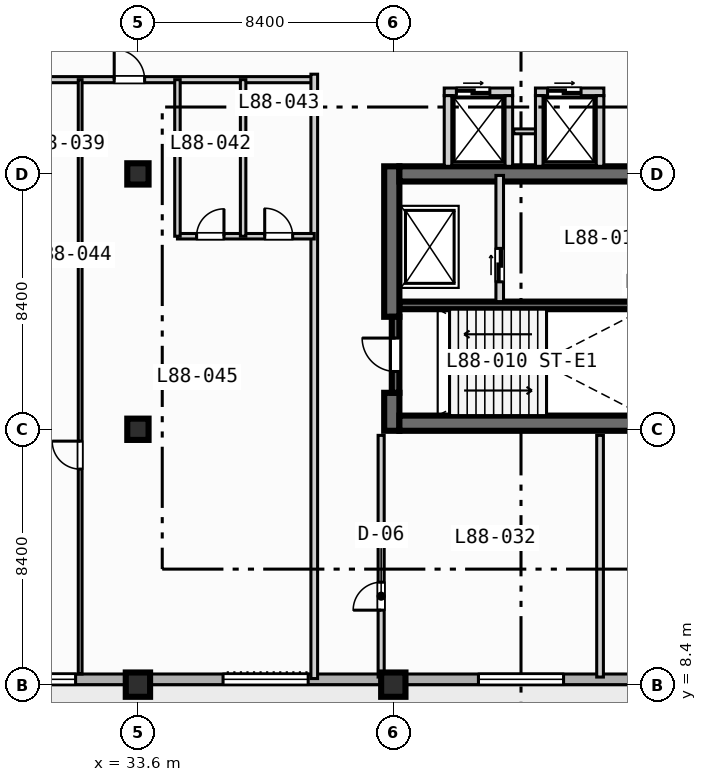
"""IFC4 building model, lengths in metres.
Left out: names, types, materials, properties, quantities, classifications, styles, units other than length and angle.
Written with IfcOpenShell. Run it as: python <this file> out.ifc"""

import sys

from ifc_helpers import new_model, si_unit, direction, frame, frame_2d, origin, origin_2d, place, context, subcontext, project, spatial, rectangle, extrude, element, fill, save


model = new_model("IFC4")
c1 = context("Model", 3, precision=1e-05, world=origin(), true_north=direction((0.0, 1.0)))
c2 = subcontext(c1, "Body", "Model", "MODEL_VIEW")
j1 = project(units=[si_unit("LENGTHUNIT", "METRE"), si_unit("PLANEANGLEUNIT", "RADIAN")], contexts=[c1])
p1 = place(None, origin())
s1 = spatial("IfcSite", under=j1, at=p1, CompositionType="ELEMENT")
p2 = place(p1, origin())
s2 = spatial("IfcBuilding", under=s1, at=p2, CompositionType="ELEMENT")
p3 = place(p2, frame((0.0, 0.0, 355.4)))
s3 = spatial("IfcBuildingStorey", under=s2, at=p3, CompositionType="ELEMENT", Elevation=355.4)
p4 = place(p3, frame((42.2, 20.875, 0.0), z_axis=(0.0, 0.0, 1.0), x_axis=(1.0, 0.0, 0.0)))
e1 = element("IfcWall", 1, at=p4, inside=s3, PredefinedType="SOLIDWALL", context=c2, shape_type="SweptSolid", body=[
    extrude(rectangle(XDim=8.05, YDim=0.25, at=frame_2d((4.025, 0.0))), origin(), (0.0, 0.0, 1.0), 3.97),
])
p5 = place(p3, frame((41.95, 16.75, 0.0), z_axis=(0.0, 0.0, 1.0), x_axis=(0.0, 1.0, 0.0)))
e2 = element("IfcWall", 2, at=p5, inside=s3, PredefinedType="SHEAR", context=c2, shape_type="SweptSolid", body=[
    extrude(rectangle(XDim=1.25, YDim=0.5, at=frame_2d((0.625, 0.0))), origin(), (0.0, 0.0, 1.0), 3.97),
])
p6 = place(p3, frame((41.95, 20.5, 0.0), z_axis=(0.0, 0.0, 1.0), x_axis=(0.0, 1.0, 0.0)))
e3 = element("IfcWall", 3, at=p6, inside=s3, PredefinedType="SHEAR", context=c2, shape_type="SweptSolid", body=[
    extrude(rectangle(XDim=4.95, YDim=0.5, at=frame_2d((2.475, 0.0))), origin(), (0.0, 0.0, 1.0), 3.97),
])
p7 = place(p3, frame((42.2, 17.0, 0.0), z_axis=(0.0, 0.0, 1.0), x_axis=(1.0, 0.0, 0.0)))
e4 = element("IfcWall", 4, at=p7, inside=s3, PredefinedType="SHEAR", context=c2, shape_type="SweptSolid", body=[
    extrude(rectangle(XDim=16.35, YDim=0.5, at=frame_2d((8.175, 0.0))), origin(), (0.0, 0.0, 1.0), 3.97),
])
p8 = place(p3, frame((42.2, 25.2, 0.0), z_axis=(0.0, 0.0, 1.0), x_axis=(1.0, 0.0, 0.0)))
e5 = element("IfcWall", 5, at=p8, inside=s3, PredefinedType="SHEAR", context=c2, shape_type="SweptSolid", body=[
    extrude(rectangle(XDim=8.6, YDim=0.5, at=frame_2d((4.3, 0.0))), origin(), (0.0, 0.0, 1.0), 3.97),
])
p9 = place(p3, frame((33.6, 8.4, 0.0), z_axis=(0.0, 0.0, 1.0), x_axis=(1.0, 0.0, 0.0)))
e6 = element("IfcColumn", 6, at=p9, inside=s3, PredefinedType="COLUMN", context=c2, shape_type="SweptSolid", body=[
    extrude(rectangle(XDim=0.8, YDim=0.8, at=origin_2d()), origin(), (0.0, 0.0, 1.0), 4.2),
])
for number, where, z_axis, x_axis in (
    (7, (33.6, 16.8, 0.0), (0.0, 0.0, 1.0), (1.0, 0.0, 0.0)),
    (8, (33.6, 25.2, 0.0), (0.0, 0.0, 1.0), (1.0, 0.0, 0.0)),
):
    element("IfcColumn", number, at=place(p3, frame(where, z_axis=z_axis, x_axis=x_axis)), inside=s3, PredefinedType="COLUMN", context=c2, shape_type="SweptSolid", body=[
        extrude(rectangle(XDim=0.7, YDim=0.7, at=origin_2d()), origin(), (0.0, 0.0, 1.0), 4.2),
    ])
p10 = place(p3, frame((42.0, 8.4, 0.0), z_axis=(0.0, 0.0, 1.0), x_axis=(1.0, 0.0, 0.0)))
e9 = element("IfcColumn", 9, at=p10, inside=s3, PredefinedType="COLUMN", context=c2, shape_type="SweptSolid", body=[
    extrude(rectangle(XDim=0.8, YDim=0.8, at=origin_2d()), origin(), (0.0, 0.0, 1.0), 4.2),
])
p11 = place(p3, frame((64.025, 8.575, 0.0), z_axis=(0.0, 0.0, 1.0), x_axis=(-1.0, 0.0, 0.0)))
e10 = element("IfcWall", 10, at=p11, inside=s3, PredefinedType="STANDARD", context=c2, shape_type="SweptSolid", body=[
    extrude(rectangle(XDim=52.45, YDim=0.35, at=frame_2d((26.225, 0.0))), origin(), (0.0, 0.0, 1.0), 3.97),
])
p12 = place(p11, frame((34.925, 0.0, 0.0)))
e11 = element("IfcOpeningElement", 11, at=p12, cuts=e10, PredefinedType="OPENING", context=c2, shape_type="SweptSolid", body=[
    extrude(rectangle(XDim=1.4, YDim=2.2, at=frame_2d((0.7, 1.1))), frame((0.0, 0.185, 0.0), z_axis=(0.0, -1.0, 0.0), x_axis=(1.0, 0.0, 0.0)), (0.0, 0.0, 1.0), 0.37),
])
p13 = place(p11, frame((24.825, 0.0, 0.85)))
e12 = element("IfcOpeningElement", 12, at=p13, cuts=e10, PredefinedType="OPENING", context=c2, shape_type="SweptSolid", body=[
    extrude(rectangle(XDim=2.8, YDim=2.1, at=frame_2d((1.4, 1.05))), frame((0.0, 0.185, 0.0), z_axis=(0.0, -1.0, 0.0), x_axis=(1.0, 0.0, 0.0)), (0.0, 0.0, 1.0), 0.37),
])
p14 = place(p11, frame((16.425, 0.0, 0.85)))
e13 = element("IfcOpeningElement", 13, at=p14, cuts=e10, PredefinedType="OPENING", context=c2, shape_type="SweptSolid", body=[
    extrude(rectangle(XDim=2.8, YDim=2.1, at=frame_2d((1.4, 1.05))), frame((0.0, 0.185, 0.0), z_axis=(0.0, -1.0, 0.0), x_axis=(1.0, 0.0, 0.0)), (0.0, 0.0, 1.0), 0.37),
])
p15 = place(p11, frame((50.275, 0.0, 0.85)))
e14 = element("IfcOpeningElement", 14, at=p15, cuts=e10, PredefinedType="OPENING", context=c2, shape_type="SweptSolid", body=[
    extrude(rectangle(XDim=1.8, YDim=1.8, at=frame_2d((0.9, 0.9))), frame((0.0, 0.185, 0.0), z_axis=(0.0, -1.0, 0.0), x_axis=(1.0, 0.0, 0.0)), (0.0, 0.0, 1.0), 0.37),
])
p16 = place(p11, frame((44.875, 0.0, 0.85)))
e15 = element("IfcOpeningElement", 15, at=p16, cuts=e10, PredefinedType="OPENING", context=c2, shape_type="SweptSolid", body=[
    extrude(rectangle(XDim=1.8, YDim=1.8, at=frame_2d((0.9, 0.9))), frame((0.0, 0.185, 0.0), z_axis=(0.0, -1.0, 0.0), x_axis=(1.0, 0.0, 0.0)), (0.0, 0.0, 1.0), 0.37),
])
p17 = place(p11, frame((41.475, 0.0, 0.85)))
e16 = element("IfcOpeningElement", 16, at=p17, cuts=e10, PredefinedType="OPENING", context=c2, shape_type="SweptSolid", body=[
    extrude(rectangle(XDim=1.8, YDim=1.8, at=frame_2d((0.9, 0.9))), frame((0.0, 0.185, 0.0), z_axis=(0.0, -1.0, 0.0), x_axis=(1.0, 0.0, 0.0)), (0.0, 0.0, 1.0), 0.37),
])
p18 = place(p11, frame((32.475, 0.0, 0.85)))
e17 = element("IfcOpeningElement", 17, at=p18, cuts=e10, PredefinedType="OPENING", context=c2, shape_type="SweptSolid", body=[
    extrude(rectangle(XDim=1.8, YDim=1.8, at=frame_2d((0.9, 0.9))), frame((0.0, 0.185, 0.0), z_axis=(0.0, -1.0, 0.0), x_axis=(1.0, 0.0, 0.0)), (0.0, 0.0, 1.0), 0.37),
])
p19 = place(p3, frame((42.075, 18.0, 0.0), z_axis=(0.0, 0.0, 1.0), x_axis=(0.0, 1.0, 0.0)))
e18 = element("IfcWall", 18, at=p19, inside=s3, PredefinedType="SOLIDWALL", context=c2, shape_type="SweptSolid", body=[
    extrude(rectangle(XDim=2.5, YDim=0.25, at=frame_2d((1.25, 0.0))), origin(), (0.0, 0.0, 1.0), 3.97),
])
p20 = place(p19, frame((0.7, 0.0, 0.0)))
e19 = element("IfcOpeningElement", 19, at=p20, cuts=e18, PredefinedType="OPENING", context=c2, shape_type="SweptSolid", body=[
    extrude(rectangle(XDim=1.1, YDim=2.15, at=frame_2d((0.55, 1.075))), frame((0.0, 0.135, 0.0), z_axis=(0.0, -1.0, 0.0), x_axis=(1.0, 0.0, 0.0)), (0.0, 0.0, 1.0), 0.27),
])
p21 = place(p3, frame((45.5, 21.0, 0.0), z_axis=(0.0, 0.0, 1.0), x_axis=(0.0, 1.0, 0.0)))
e20 = element("IfcWall", 20, at=p21, inside=s3, PredefinedType="SOLIDWALL", context=c2, shape_type="SweptSolid", body=[
    extrude(rectangle(XDim=4.15, YDim=0.25, at=frame_2d((2.075, 0.0))), origin(), (0.0, 0.0, 1.0), 3.97),
])
p22 = place(p21, frame((0.65, 0.0, 0.0)))
e21 = element("IfcOpeningElement", 21, at=p22, cuts=e20, PredefinedType="OPENING", context=c2, shape_type="SweptSolid", body=[
    extrude(rectangle(XDim=1.1, YDim=2.15, at=frame_2d((0.55, 1.075))), frame((0.0, 0.135, 0.0), z_axis=(0.0, -1.0, 0.0), x_axis=(1.0, 0.0, 0.0)), (0.0, 0.0, 1.0), 0.27),
])
p23 = place(p3, frame((43.675, 27.9, 0.0), z_axis=(0.0, 0.0, 1.0), x_axis=(1.0, 0.0, 0.0)))
e22 = element("IfcWall", 22, at=p23, inside=s3, PredefinedType="SOLIDWALL", context=c2, shape_type="SweptSolid", body=[
    extrude(rectangle(XDim=2.25, YDim=0.25, at=frame_2d((1.125, 0.0))), origin(), (0.0, 0.0, 1.0), 3.97),
])
p24 = place(p23, frame((0.4, 0.0, 0.0)))
e23 = element("IfcOpeningElement", 23, at=p24, cuts=e22, PredefinedType="OPENING", context=c2, shape_type="SweptSolid", body=[
    extrude(rectangle(XDim=1.1, YDim=2.15, at=frame_2d((0.55, 1.075))), frame((0.0, 0.135, 0.0), z_axis=(0.0, -1.0, 0.0), x_axis=(1.0, 0.0, 0.0)), (0.0, 0.0, 1.0), 0.27),
])
for number, where, z_axis, x_axis in (
    (24, (43.8, 25.45, 0.0), (0.0, 0.0, 1.0), (0.0, 1.0, 0.0)),
    (25, (45.8, 25.45, 0.0), (0.0, 0.0, 1.0), (0.0, 1.0, 0.0)),
):
    element("IfcWall", number, at=place(p3, frame(where, z_axis=z_axis, x_axis=x_axis)), inside=s3, PredefinedType="SOLIDWALL", context=c2, shape_type="SweptSolid", body=[
        extrude(rectangle(XDim=2.325, YDim=0.25, at=frame_2d((1.163, 0.0))), origin(), (0.0, 0.0, 1.0), 3.97),
    ])
p25 = place(p3, frame((45.96, 26.6, 0.0), z_axis=(0.0, 0.0, 1.0), x_axis=(1.0, 0.0, 0.0)))
e26 = element("IfcWall", 26, at=p25, inside=s3, PredefinedType="PARTITIONING", context=c2, shape_type="SweptSolid", body=[
    extrude(rectangle(XDim=0.88, YDim=0.16, at=frame_2d((0.44, 0.0))), origin(), (0.0, 0.0, 1.0), 3.97),
])
p26 = place(p3, frame((46.675, 27.9, 0.0), z_axis=(0.0, 0.0, 1.0), x_axis=(1.0, 0.0, 0.0)))
e27 = element("IfcWall", 27, at=p26, inside=s3, PredefinedType="SOLIDWALL", context=c2, shape_type="SweptSolid", body=[
    extrude(rectangle(XDim=2.25, YDim=0.25, at=frame_2d((1.125, 0.0))), origin(), (0.0, 0.0, 1.0), 3.97),
])
p27 = place(p26, frame((0.4, 0.0, 0.0)))
e28 = element("IfcOpeningElement", 28, at=p27, cuts=e27, PredefinedType="OPENING", context=c2, shape_type="SweptSolid", body=[
    extrude(rectangle(XDim=1.1, YDim=2.15, at=frame_2d((0.55, 1.075))), frame((0.0, 0.135, 0.0), z_axis=(0.0, -1.0, 0.0), x_axis=(1.0, 0.0, 0.0)), (0.0, 0.0, 1.0), 0.27),
])
for number, where, z_axis, x_axis in (
    (29, (46.8, 25.45, 0.0), (0.0, 0.0, 1.0), (0.0, 1.0, 0.0)),
    (30, (48.8, 25.45, 0.0), (0.0, 0.0, 1.0), (0.0, 1.0, 0.0)),
):
    element("IfcWall", number, at=place(p3, frame(where, z_axis=z_axis, x_axis=x_axis)), inside=s3, PredefinedType="SOLIDWALL", context=c2, shape_type="SweptSolid", body=[
        extrude(rectangle(XDim=2.325, YDim=0.25, at=frame_2d((1.163, 0.0))), origin(), (0.0, 0.0, 1.0), 3.97),
    ])
p28 = place(p3, frame((41.6, 8.65, 0.0), z_axis=(0.0, 0.0, 1.0), x_axis=(0.0, 1.0, 0.0)))
e31 = element("IfcWall", 31, at=p28, inside=s3, PredefinedType="PARTITIONING", context=c2, shape_type="SweptSolid", body=[
    extrude(rectangle(XDim=7.95, YDim=0.2, at=frame_2d((3.975, 0.0))), origin(), (0.0, 0.0, 1.0), 3.97),
])
p29 = place(p28, frame((2.2, 0.0, 0.0)))
e32 = element("IfcOpeningElement", 32, at=p29, cuts=e31, PredefinedType="OPENING", context=c2, shape_type="SweptSolid", body=[
    extrude(rectangle(XDim=0.92, YDim=2.1, at=frame_2d((0.46, 1.05))), frame((0.0, 0.11, 0.0), z_axis=(0.0, -1.0, 0.0), x_axis=(1.0, 0.0, 0.0)), (0.0, 0.0, 1.0), 0.22),
])
p30 = place(p3, frame((48.8, 8.65, 0.0), z_axis=(0.0, 0.0, 1.0), x_axis=(0.0, 1.0, 0.0)))
e33 = element("IfcWall", 33, at=p30, inside=s3, PredefinedType="PARTITIONING", context=c2, shape_type="SweptSolid", body=[
    extrude(rectangle(XDim=7.95, YDim=0.22, at=frame_2d((3.975, 0.0))), origin(), (0.0, 0.0, 1.0), 3.97),
])
p31 = place(p3, frame((11.8, 28.3, 0.0), z_axis=(0.0, 0.0, 1.0), x_axis=(1.0, 0.0, 0.0)))
e34 = element("IfcWall", 34, at=p31, inside=s3, PredefinedType="PARTITIONING", context=c2, shape_type="SweptSolid", body=[
    extrude(rectangle(XDim=27.6, YDim=0.2, at=frame_2d((13.8, 0.0))), origin(), (0.0, 0.0, 1.0), 3.97),
])
p32 = place(p31, frame((2.72, 0.0, 0.0)))
e35 = element("IfcOpeningElement", 35, at=p32, cuts=e34, PredefinedType="OPENING", context=c2, shape_type="SweptSolid", body=[
    extrude(rectangle(XDim=1.0, YDim=2.15, at=frame_2d((0.5, 1.075))), frame((0.0, 0.11, 0.0), z_axis=(0.0, -1.0, 0.0), x_axis=(1.0, 0.0, 0.0)), (0.0, 0.0, 1.0), 0.22),
])
p33 = place(p31, frame((11.62, 0.0, 0.0)))
e36 = element("IfcOpeningElement", 36, at=p33, cuts=e34, PredefinedType="OPENING", context=c2, shape_type="SweptSolid", body=[
    extrude(rectangle(XDim=1.0, YDim=2.15, at=frame_2d((0.5, 1.075))), frame((0.0, 0.11, 0.0), z_axis=(0.0, -1.0, 0.0), x_axis=(1.0, 0.0, 0.0)), (0.0, 0.0, 1.0), 0.22),
])
p34 = place(p31, frame((21.02, 0.0, 0.0)))
e37 = element("IfcOpeningElement", 37, at=p34, cuts=e34, PredefinedType="OPENING", context=c2, shape_type="SweptSolid", body=[
    extrude(rectangle(XDim=1.0, YDim=2.15, at=frame_2d((0.5, 1.075))), frame((0.0, 0.11, 0.0), z_axis=(0.0, -1.0, 0.0), x_axis=(1.0, 0.0, 0.0)), (0.0, 0.0, 1.0), 0.22),
])
p35 = place(p3, frame((39.4, 8.6, 0.0), z_axis=(0.0, 0.0, 1.0), x_axis=(0.0, 1.0, 0.0)))
e38 = element("IfcWall", 38, at=p35, inside=s3, PredefinedType="PARTITIONING", context=c2, shape_type="SweptSolid", body=[
    extrude(rectangle(XDim=19.88, YDim=0.22, at=frame_2d((9.94, 0.0))), origin(), (0.0, 0.0, 1.0), 3.97),
])
p36 = place(p3, frame((34.9, 23.15, 0.0), z_axis=(0.0, 0.0, 1.0), x_axis=(1.0, 0.0, 0.0)))
e39 = element("IfcWall", 39, at=p36, inside=s3, PredefinedType="PLUMBINGWALL", context=c2, shape_type="SweptSolid", body=[
    extrude(rectangle(XDim=4.5, YDim=0.18, at=frame_2d((2.25, 0.0))), origin(), (0.0, 0.0, 1.0), 3.97),
])
p37 = place(p36, frame((0.63, 0.0, 0.0)))
e40 = element("IfcOpeningElement", 40, at=p37, cuts=e39, PredefinedType="OPENING", context=c2, shape_type="SweptSolid", body=[
    extrude(rectangle(XDim=0.9, YDim=2.1, at=frame_2d((0.45, 1.05))), frame((0.0, 0.1, 0.0), z_axis=(0.0, -1.0, 0.0), x_axis=(1.0, 0.0, 0.0)), (0.0, 0.0, 1.0), 0.2),
])
p38 = place(p36, frame((2.87, 0.0, 0.0)))
e41 = element("IfcOpeningElement", 41, at=p38, cuts=e39, PredefinedType="OPENING", context=c2, shape_type="SweptSolid", body=[
    extrude(rectangle(XDim=0.92, YDim=2.1, at=frame_2d((0.46, 1.05))), frame((0.0, 0.1, 0.0), z_axis=(0.0, -1.0, 0.0), x_axis=(1.0, 0.0, 0.0)), (0.0, 0.0, 1.0), 0.2),
])
for number, where, z_axis, x_axis in (
    (42, (34.9, 23.15, 0.0), (0.0, 0.0, 1.0), (0.0, 1.0, 0.0)),
    (43, (37.06, 23.15, 0.0), (0.0, 0.0, 1.0), (0.0, 1.0, 0.0)),
):
    element("IfcWall", number, at=place(p3, frame(where, z_axis=z_axis, x_axis=x_axis)), inside=s3, PredefinedType="PLUMBINGWALL", context=c2, shape_type="SweptSolid", body=[
        extrude(rectangle(XDim=5.15, YDim=0.18, at=frame_2d((2.575, 0.0))), origin(), (0.0, 0.0, 1.0), 3.97),
    ])
p39 = place(p3, frame((31.7, 8.75, 0.0), z_axis=(0.0, 0.0, 1.0), x_axis=(0.0, 1.0, 0.0)))
e44 = element("IfcWall", 44, at=p39, inside=s3, PredefinedType="PARTITIONING", context=c2, shape_type="SweptSolid", body=[
    extrude(rectangle(XDim=19.55, YDim=0.125, at=frame_2d((9.775, 0.0))), origin(), (0.0, 0.0, 1.0), 3.97),
])
p40 = place(p39, frame((6.74, 0.0, 0.0)))
e45 = element("IfcOpeningElement", 45, at=p40, cuts=e44, PredefinedType="OPENING", context=c2, shape_type="SweptSolid", body=[
    extrude(rectangle(XDim=0.92, YDim=2.1, at=frame_2d((0.46, 1.05))), frame((0.0, 0.073, 0.0), z_axis=(0.0, -1.0, 0.0), x_axis=(1.0, 0.0, 0.0)), (0.0, 0.0, 1.0), 0.145),
])
p41 = place(p13, origin())
e46 = element("IfcWindow", 46, at=p41, inside=s3, PartitioningType="SINGLE_PANEL", PredefinedType="WINDOW", context=c2, shape_type="SweptSolid", body=[
    extrude(rectangle(XDim=2.8, YDim=2.1, at=frame_2d((1.4, 1.05))), frame((0.0, 0.03, 0.0), z_axis=(0.0, -1.0, 0.0), x_axis=(1.0, 0.0, 0.0)), (0.0, 0.0, 1.0), 0.06),
])
fill(e12, e46)
p42 = place(p14, origin())
e47 = element("IfcWindow", 47, at=p42, inside=s3, PartitioningType="SINGLE_PANEL", PredefinedType="WINDOW", context=c2, shape_type="SweptSolid", body=[
    extrude(rectangle(XDim=2.8, YDim=2.1, at=frame_2d((1.4, 1.05))), frame((0.0, 0.03, 0.0), z_axis=(0.0, -1.0, 0.0), x_axis=(1.0, 0.0, 0.0)), (0.0, 0.0, 1.0), 0.06),
])
fill(e13, e47)
p43 = place(p18, origin())
e48 = element("IfcWindow", 48, at=p43, inside=s3, PartitioningType="SINGLE_PANEL", PredefinedType="WINDOW", context=c2, shape_type="SweptSolid", body=[
    extrude(rectangle(XDim=1.8, YDim=1.8, at=frame_2d((0.9, 0.9))), frame((0.0, 0.03, 0.0), z_axis=(0.0, -1.0, 0.0), x_axis=(1.0, 0.0, 0.0)), (0.0, 0.0, 1.0), 0.06),
])
fill(e17, e48)
p44 = place(p20, origin())
e49 = element("IfcDoor", 49, at=p44, inside=s3, OperationType="SINGLE_SWING_RIGHT", PredefinedType="DOOR", context=c2, shape_type="SweptSolid", body=[
    extrude(rectangle(XDim=1.1, YDim=2.15, at=frame_2d((0.55, 1.075))), frame((0.0, 0.025, 0.0), z_axis=(0.0, -1.0, 0.0), x_axis=(1.0, 0.0, 0.0)), (0.0, 0.0, 1.0), 0.05),
])
fill(e19, e49)
p45 = place(p22, origin())
e50 = element("IfcDoor", 50, at=p45, inside=s3, OperationType="SLIDING_TO_LEFT", PredefinedType="DOOR", context=c2, shape_type="SweptSolid", body=[
    extrude(rectangle(XDim=1.1, YDim=2.15, at=frame_2d((0.55, 1.075))), frame((0.0, 0.025, 0.0), z_axis=(0.0, -1.0, 0.0), x_axis=(1.0, 0.0, 0.0)), (0.0, 0.0, 1.0), 0.05),
])
fill(e21, e50)
p46 = place(p24, origin())
e51 = element("IfcDoor", 51, at=p46, inside=s3, OperationType="SLIDING_TO_LEFT", PredefinedType="DOOR", context=c2, shape_type="SweptSolid", body=[
    extrude(rectangle(XDim=1.1, YDim=2.15, at=frame_2d((0.55, 1.075))), frame((0.0, 0.025, 0.0), z_axis=(0.0, -1.0, 0.0), x_axis=(1.0, 0.0, 0.0)), (0.0, 0.0, 1.0), 0.05),
])
fill(e23, e51)
p47 = place(p27, origin())
e52 = element("IfcDoor", 52, at=p47, inside=s3, OperationType="SLIDING_TO_LEFT", PredefinedType="DOOR", context=c2, shape_type="SweptSolid", body=[
    extrude(rectangle(XDim=1.1, YDim=2.15, at=frame_2d((0.55, 1.075))), frame((0.0, 0.025, 0.0), z_axis=(0.0, -1.0, 0.0), x_axis=(1.0, 0.0, 0.0)), (0.0, 0.0, 1.0), 0.05),
])
fill(e28, e52)
p48 = place(p29, origin())
e53 = element("IfcDoor", 53, at=p48, inside=s3, OperationType="SINGLE_SWING_LEFT", PredefinedType="DOOR", context=c2, shape_type="SweptSolid", body=[
    extrude(rectangle(XDim=0.92, YDim=2.1, at=frame_2d((0.46, 1.05))), frame((0.0, 0.025, 0.0), z_axis=(0.0, -1.0, 0.0), x_axis=(1.0, 0.0, 0.0)), (0.0, 0.0, 1.0), 0.05),
])
fill(e32, e53)
p49 = place(p34, origin())
e54 = element("IfcDoor", 54, at=p49, inside=s3, OperationType="SINGLE_SWING_LEFT", PredefinedType="DOOR", context=c2, shape_type="SweptSolid", body=[
    extrude(rectangle(XDim=1.0, YDim=2.15, at=frame_2d((0.5, 1.075))), frame((0.0, 0.025, 0.0), z_axis=(0.0, -1.0, 0.0), x_axis=(1.0, 0.0, 0.0)), (0.0, 0.0, 1.0), 0.05),
])
fill(e37, e54)
p50 = place(p37, origin())
e55 = element("IfcDoor", 55, at=p50, inside=s3, OperationType="SINGLE_SWING_RIGHT", PredefinedType="DOOR", context=c2, shape_type="SweptSolid", body=[
    extrude(rectangle(XDim=0.9, YDim=2.1, at=frame_2d((0.45, 1.05))), frame((0.0, 0.025, 0.0), z_axis=(0.0, -1.0, 0.0), x_axis=(1.0, 0.0, 0.0)), (0.0, 0.0, 1.0), 0.05),
])
fill(e40, e55)
p51 = place(p38, origin())
e56 = element("IfcDoor", 56, at=p51, inside=s3, OperationType="SINGLE_SWING_LEFT", PredefinedType="DOOR", context=c2, shape_type="SweptSolid", body=[
    extrude(rectangle(XDim=0.92, YDim=2.1, at=frame_2d((0.46, 1.05))), frame((0.0, 0.025, 0.0), z_axis=(0.0, -1.0, 0.0), x_axis=(1.0, 0.0, 0.0)), (0.0, 0.0, 1.0), 0.05),
])
fill(e41, e56)
p52 = place(p40, origin())
e57 = element("IfcDoor", 57, at=p52, inside=s3, OperationType="SINGLE_SWING_RIGHT", PredefinedType="DOOR", context=c2, shape_type="SweptSolid", body=[
    extrude(rectangle(XDim=0.92, YDim=2.1, at=frame_2d((0.46, 1.05))), frame((0.0, 0.025, 0.0), z_axis=(0.0, -1.0, 0.0), x_axis=(1.0, 0.0, 0.0)), (0.0, 0.0, 1.0), 0.05),
])
fill(e45, e57)
save(model, sys.argv[1])
